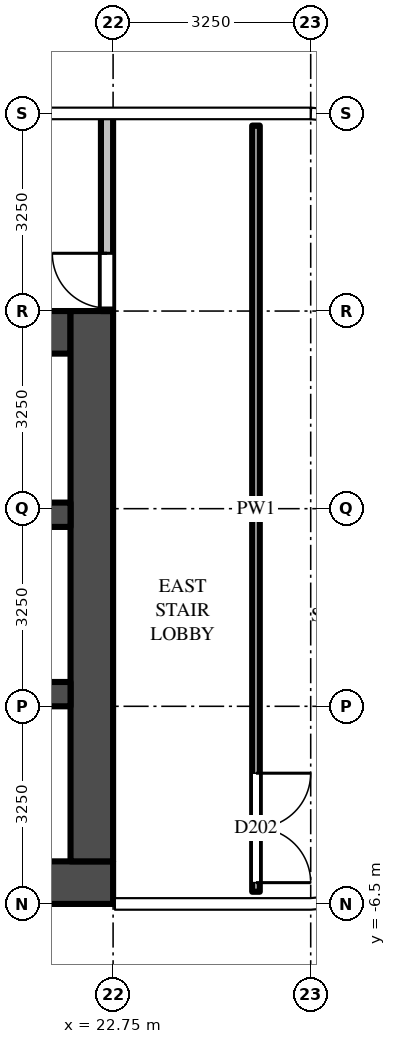
"""IFC4 building model, lengths in metres.
Left out: names, types, materials, properties, quantities, classifications, styles, units other than length and angle.
Written with IfcOpenShell. Run it as: python <this file> out.ifc"""

import sys

from ifc_helpers import new_model, si_unit, direction, frame, frame_2d, origin, place, context, subcontext, project, spatial, rectangle, extrude, source, transform, mapped, element, fill, save


model = new_model("IFC4")
c1 = context("Model", 3, precision=1e-05, world=origin(), true_north=direction((0.0, 1.0)))
c2 = subcontext(c1, "Body", "Model", "MODEL_VIEW")
j1 = project(units=[si_unit("LENGTHUNIT", "METRE"), si_unit("PLANEANGLEUNIT", "RADIAN")], contexts=[c1])
p1 = place(None, origin())
s1 = spatial("IfcSite", under=j1, at=p1, CompositionType="ELEMENT")
p2 = place(p1, origin())
s2 = spatial("IfcBuilding", under=s1, at=p2, CompositionType="ELEMENT")
p3 = place(p2, frame((0.0, 0.0, 129.0)))
s3 = spatial("IfcBuildingStorey", under=s2, at=p3, CompositionType="ELEMENT", Elevation=129.0)
m1 = source(origin(), c2, "Body", "SweptSolid", [
    extrude(rectangle(XDim=16.5, YDim=0.7, at=frame_2d((8.25, 0.0))), origin(), (0.0, 0.0, 1.0), 4.25),
])
p4 = place(p3, frame((6.25, -6.15, 0.0), z_axis=(0.0, 0.0, 1.0), x_axis=(1.0, 0.0, 0.0)))
e1 = element("IfcWall", 1, at=p4, inside=s3, PredefinedType="SHEAR", context=c2, shape_type="MappedRepresentation", body=[
    mapped(m1, transform((0.0, 0.0, 0.0))),
])
m2 = source(origin(), c2, "Body", "SweptSolid", [
    extrude(rectangle(XDim=14.85, YDim=0.7, at=frame_2d((7.425, 0.0))), origin(), (0.0, 0.0, 1.0), 4.25),
])
p5 = place(p3, frame((7.2, 2.9, 0.0), z_axis=(0.0, 0.0, 1.0), x_axis=(1.0, 0.0, 0.0)))
e2 = element("IfcWall", 2, at=p5, inside=s3, PredefinedType="SHEAR", context=c2, shape_type="MappedRepresentation", body=[
    mapped(m2, transform((0.0, 0.0, 0.0))),
])
m3 = source(origin(), c2, "Body", "SweptSolid", [
    extrude(rectangle(XDim=1.3, YDim=2.1, at=frame_2d((0.65, 1.05))), frame((0.0, 0.36, 0.0), z_axis=(0.0, -1.0, 0.0), x_axis=(1.0, 0.0, 0.0)), (0.0, 0.0, 1.0), 0.72),
])
p6 = place(p5, frame((12.2, 0.0, 0.0)))
e3 = element("IfcOpeningElement", 3, at=p6, cuts=e2, PredefinedType="OPENING", context=c2, shape_type="MappedRepresentation", body=[
    mapped(m3, transform((0.0, 0.0, 0.0))),
])
m4 = source(origin(), c2, "Body", "SweptSolid", [
    extrude(rectangle(XDim=1.2, YDim=2.1, at=frame_2d((0.6, 1.05))), frame((0.0, 0.36, 0.0), z_axis=(0.0, -1.0, 0.0), x_axis=(1.0, 0.0, 0.0)), (0.0, 0.0, 1.0), 0.72),
])
p7 = place(p5, frame((9.85, 0.0, 0.0)))
e4 = element("IfcOpeningElement", 4, at=p7, cuts=e2, PredefinedType="OPENING", context=c2, shape_type="MappedRepresentation", body=[
    mapped(m4, transform((0.0, 0.0, 0.0))),
])
m5 = source(origin(), c2, "Body", "SweptSolid", [
    extrude(rectangle(XDim=1.0, YDim=2.1, at=frame_2d((0.5, 1.05))), frame((0.0, 0.36, 0.0), z_axis=(0.0, -1.0, 0.0), x_axis=(1.0, 0.0, 0.0)), (0.0, 0.0, 1.0), 0.72),
])
p8 = place(p5, frame((7.9, 0.0, 0.0)))
e5 = element("IfcOpeningElement", 5, at=p8, cuts=e2, PredefinedType="OPENING", context=c2, shape_type="MappedRepresentation", body=[
    mapped(m5, transform((0.0, 0.0, 0.0))),
])
m6 = source(origin(), c2, "Body", "SweptSolid", [
    extrude(rectangle(XDim=0.9, YDim=2.1, at=frame_2d((0.45, 1.05))), frame((0.0, 0.36, 0.0), z_axis=(0.0, -1.0, 0.0), x_axis=(1.0, 0.0, 0.0)), (0.0, 0.0, 1.0), 0.72),
])
p9 = place(p5, frame((0.65, 0.0, 0.0)))
e6 = element("IfcOpeningElement", 6, at=p9, cuts=e2, PredefinedType="OPENING", context=c2, shape_type="MappedRepresentation", body=[
    mapped(m6, transform((0.0, 0.0, 0.0))),
])
p10 = place(p5, frame((3.2, 0.0, 0.0)))
e7 = element("IfcOpeningElement", 7, at=p10, cuts=e2, PredefinedType="OPENING", context=c2, shape_type="MappedRepresentation", body=[
    mapped(m5, transform((0.0, 0.0, 0.0))),
])
p11 = place(p5, frame((5.85, 0.0, 0.0)))
e8 = element("IfcOpeningElement", 8, at=p11, cuts=e2, PredefinedType="OPENING", context=c2, shape_type="MappedRepresentation", body=[
    mapped(m6, transform((0.0, 0.0, 0.0))),
])
m7 = source(origin(), c2, "Body", "SweptSolid", [
    extrude(rectangle(XDim=9.05, YDim=0.7, at=frame_2d((4.525, 0.0))), origin(), (0.0, 0.0, 1.0), 4.25),
])
p12 = place(p3, frame((22.4, -5.8, 0.0), z_axis=(0.0, 0.0, 1.0), x_axis=(0.0, 1.0, 0.0)))
e9 = element("IfcWall", 9, at=p12, inside=s3, PredefinedType="SHEAR", context=c2, shape_type="MappedRepresentation", body=[
    mapped(m7, transform((0.0, 0.0, 0.0))),
])
m8 = source(origin(), c2, "Body", "SweptSolid", [
    extrude(rectangle(XDim=14.85, YDim=0.4, at=frame_2d((7.425, 0.0))), origin(), (0.0, 0.0, 1.0), 4.25),
])
p13 = place(p3, frame((7.2, -0.1, 0.0), z_axis=(0.0, 0.0, 1.0), x_axis=(1.0, 0.0, 0.0)))
e10 = element("IfcWall", 10, at=p13, inside=s3, PredefinedType="SHEAR", context=c2, shape_type="MappedRepresentation", body=[
    mapped(m8, transform((0.0, 0.0, 0.0))),
])
m9 = source(origin(), c2, "Body", "SweptSolid", [
    extrude(rectangle(XDim=1.0, YDim=2.1, at=frame_2d((0.5, 1.05))), frame((0.0, 0.21, 0.0), z_axis=(0.0, -1.0, 0.0), x_axis=(1.0, 0.0, 0.0)), (0.0, 0.0, 1.0), 0.42),
])
p14 = place(p13, frame((7.9, 0.0, 0.0)))
e11 = element("IfcOpeningElement", 11, at=p14, cuts=e10, PredefinedType="OPENING", context=c2, shape_type="MappedRepresentation", body=[
    mapped(m9, transform((0.0, 0.0, 0.0))),
])
m10 = source(origin(), c2, "Body", "SweptSolid", [
    extrude(rectangle(XDim=5.7, YDim=0.4, at=frame_2d((2.85, 0.0))), origin(), (0.0, 0.0, 1.0), 4.25),
])
p15 = place(p3, frame((16.35, -3.05, 0.0), z_axis=(0.0, 0.0, 1.0), x_axis=(1.0, 0.0, 0.0)))
e12 = element("IfcWall", 12, at=p15, inside=s3, PredefinedType="SHEAR", context=c2, shape_type="MappedRepresentation", body=[
    mapped(m10, transform((0.0, 0.0, 0.0))),
])
m11 = source(origin(), c2, "Body", "SweptSolid", [
    extrude(rectangle(XDim=3.25, YDim=0.2, at=frame_2d((1.625, 0.0))), origin(), (0.0, 0.0, 1.0), 4.25),
])
p16 = place(p3, frame((22.65, 3.25, 0.0), z_axis=(0.0, 0.0, 1.0), x_axis=(0.0, 1.0, 0.0)))
e13 = element("IfcWall", 13, at=p16, inside=s3, PredefinedType="PARTITIONING", context=c2, shape_type="MappedRepresentation", body=[
    mapped(m11, transform((0.0, 0.0, 0.0))),
])
m12 = source(origin(), c2, "Body", "SweptSolid", [
    extrude(rectangle(XDim=0.9, YDim=2.1, at=frame_2d((0.45, 1.05))), frame((0.0, 0.11, 0.0), z_axis=(0.0, -1.0, 0.0), x_axis=(1.0, 0.0, 0.0)), (0.0, 0.0, 1.0), 0.22),
])
p17 = place(p16, frame((0.05, 0.0, 0.0)))
e14 = element("IfcOpeningElement", 14, at=p17, cuts=e13, PredefinedType="OPENING", context=c2, shape_type="MappedRepresentation", body=[
    mapped(m12, transform((0.0, 0.0, 0.0))),
])
m13 = source(origin(), c2, "Body", "SweptSolid", [
    extrude(rectangle(XDim=12.6, YDim=0.125, at=frame_2d((6.3, 0.0))), origin(), (0.0, 0.0, 1.0), 3.33),
])
p18 = place(p3, frame((25.1, 6.3, 0.0), z_axis=(0.0, 0.0, 1.0), x_axis=(0.0, -1.0, 0.0)))
e15 = element("IfcWall", 15, at=p18, inside=s3, PredefinedType="PARTITIONING", context=c2, shape_type="MappedRepresentation", body=[
    mapped(m13, transform((0.0, 0.0, 0.0))),
])
m14 = source(origin(), c2, "Body", "SweptSolid", [
    extrude(rectangle(XDim=1.8, YDim=2.1, at=frame_2d((0.9, 1.05))), frame((0.0, 0.073, 0.0), z_axis=(0.0, -1.0, 0.0), x_axis=(1.0, 0.0, 0.0)), (0.0, 0.0, 1.0), 0.145),
])
p19 = place(p18, frame((10.65, 0.0, 0.0)))
e16 = element("IfcOpeningElement", 16, at=p19, cuts=e15, PredefinedType="OPENING", context=c2, shape_type="MappedRepresentation", body=[
    mapped(m14, transform((0.0, 0.0, 0.0))),
])
m15 = source(origin(), c2, "Body", "SweptSolid", [
    extrude(rectangle(XDim=0.9, YDim=2.1, at=frame_2d((0.45, 1.05))), frame((0.0, 0.025, 0.0), z_axis=(0.0, -1.0, 0.0), x_axis=(1.0, 0.0, 0.0)), (0.0, 0.0, 1.0), 0.05),
])
p20 = place(p17, origin())
e17 = element("IfcDoor", 17, at=p20, inside=s3, OperationType="SINGLE_SWING_RIGHT", PredefinedType="DOOR", context=c2, shape_type="MappedRepresentation", body=[
    mapped(m15, transform((0.0, 0.0, 0.0))),
])
fill(e14, e17)
m16 = source(origin(), c2, "Body", "SweptSolid", [
    extrude(rectangle(XDim=1.8, YDim=2.1, at=frame_2d((0.9, 1.05))), frame((0.0, 0.025, 0.0), z_axis=(0.0, -1.0, 0.0), x_axis=(1.0, 0.0, 0.0)), (0.0, 0.0, 1.0), 0.05),
])
p21 = place(p19, origin())
e18 = element("IfcDoor", 18, at=p21, inside=s3, OperationType="DOUBLE_DOOR_SINGLE_SWING", PredefinedType="DOOR", context=c2, shape_type="MappedRepresentation", body=[
    mapped(m16, transform((0.0, 0.0, 0.0))),
])
fill(e16, e18)
save(model, sys.argv[1])
